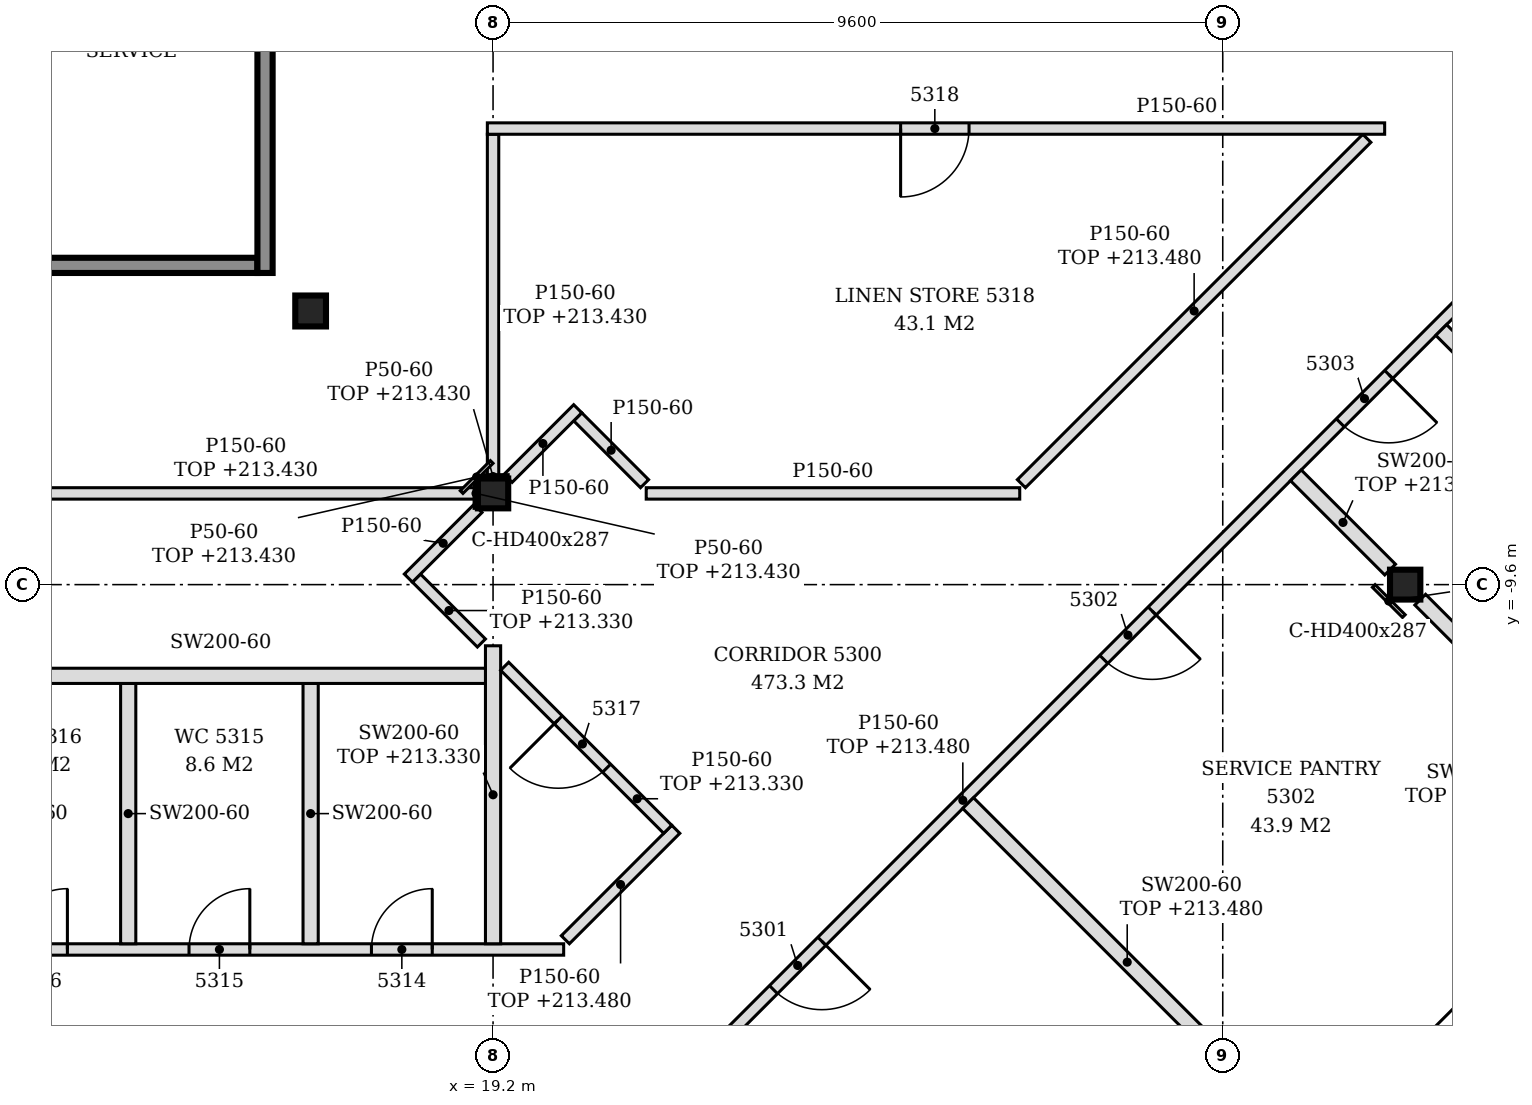
"""IFC4 building model, lengths in metres.
Left out: names, types, materials, properties, quantities, classifications, styles, units other than length and angle.
Written with IfcOpenShell. Run it as: python <this file> out.ifc"""

import sys

from ifc_helpers import new_model, si_unit, direction, frame, frame_2d, origin, origin_2d, place, context, subcontext, project, spatial, polyline, rectangle, i_section, outline, extrude, element, fill, save


model = new_model("IFC4")
c1 = context("Model", 3, precision=1e-05, world=origin(), true_north=direction((0.0, 1.0)))
c2 = subcontext(c1, "Body", "Model", "MODEL_VIEW")
j1 = project(units=[si_unit("LENGTHUNIT", "METRE"), si_unit("PLANEANGLEUNIT", "RADIAN")], contexts=[c1])
p1 = place(None, origin())
s1 = spatial("IfcSite", under=j1, at=p1, CompositionType="ELEMENT")
p2 = place(p1, origin())
s2 = spatial("IfcBuilding", under=s1, at=p2, CompositionType="ELEMENT")
p3 = place(p2, frame((0.0, 0.0, 210.6)))
s3 = spatial("IfcBuildingStorey", under=s2, at=p3, CompositionType="ELEMENT", Elevation=210.6)
p4 = place(p3, frame((19.2, -8.4, -0.15), z_axis=(0.0, 0.0, 1.0), x_axis=(1.0, 0.0, 0.0)))
e1 = element("IfcColumn", 1, at=p4, inside=s3, PredefinedType="COLUMN", context=c2, shape_type="SweptSolid", body=[
    extrude(i_section(OverallWidth=0.399, OverallDepth=0.393, WebThickness=0.023, FlangeThickness=0.037, FilletRadius=0.015, at=origin_2d()), origin(), (0.0, 0.0, 1.0), 3.6),
])
p5 = place(p3, frame((16.8, -6.0, -0.15), z_axis=(0.0, 0.0, 1.0), x_axis=(1.0, 0.0, 0.0)))
e2 = element("IfcColumn", 2, at=p5, inside=s3, PredefinedType="COLUMN", context=c2, shape_type="SweptSolid", body=[
    extrude(i_section(OverallWidth=0.404, OverallDepth=0.407, WebThickness=0.027, FlangeThickness=0.044, FilletRadius=0.015, at=origin_2d()), origin(), (0.0, 0.0, 1.0), 3.6),
])
p6 = place(p3, frame((31.2, -9.6, -0.15), z_axis=(0.0, 0.0, 1.0), x_axis=(1.0, 0.0, 0.0)))
e3 = element("IfcColumn", 3, at=p6, inside=s3, PredefinedType="COLUMN", context=c2, shape_type="SweptSolid", body=[
    extrude(i_section(OverallWidth=0.399, OverallDepth=0.393, WebThickness=0.023, FlangeThickness=0.037, FilletRadius=0.015, at=origin_2d()), origin(), (0.0, 0.0, 1.0), 3.6),
])
p7 = place(p3, frame((12.7, -5.4, 0.0), z_axis=(0.0, 0.0, 1.0), x_axis=(1.0, 0.0, 0.0)))
e4 = element("IfcWall", 4, at=p7, inside=s3, PredefinedType="SOLIDWALL", context=c2, shape_type="SweptSolid", body=[
    extrude(rectangle(XDim=3.4, YDim=0.2, at=frame_2d((1.7, 0.0))), origin(), (0.0, 0.0, 1.0), 3.45),
])
p8 = place(p3, frame((16.2, -5.5, 0.0), z_axis=(0.0, 0.0, 1.0), x_axis=(0.0, 1.0, 0.0)))
e5 = element("IfcWall", 5, at=p8, inside=s3, PredefinedType="SOLIDWALL", context=c2, shape_type="SweptSolid", body=[
    extrude(rectangle(XDim=15.8, YDim=0.2, at=frame_2d((7.9, 0.0))), origin(), (0.0, 0.0, 1.0), 3.45),
])
p9 = place(p8, frame((3.05, 0.0, 0.0)))
e6 = element("IfcOpeningElement", 6, at=p9, cuts=e5, PredefinedType="OPENING", context=c2, shape_type="SweptSolid", body=[
    extrude(rectangle(XDim=1.3, YDim=2.1, at=frame_2d((0.65, 1.05))), frame((0.0, 0.11, 0.0), z_axis=(0.0, -1.0, 0.0), x_axis=(1.0, 0.0, 0.0)), (0.0, 0.0, 1.0), 0.22),
])
p10 = place(p8, frame((11.45, 0.0, 0.0)))
e7 = element("IfcOpeningElement", 7, at=p10, cuts=e5, PredefinedType="OPENING", context=c2, shape_type="SweptSolid", body=[
    extrude(rectangle(XDim=1.3, YDim=2.1, at=frame_2d((0.65, 1.05))), frame((0.0, 0.11, 0.0), z_axis=(0.0, -1.0, 0.0), x_axis=(1.0, 0.0, 0.0)), (0.0, 0.0, 1.0), 0.22),
])
p11 = place(p3, frame((21.146, -16.672, 0.0), z_axis=(0.0, 0.0, 1.0), x_axis=(0.707100999376, 0.70711256295, 0.0)))
e8 = element("IfcWall", 8, at=p11, inside=s3, PredefinedType="PARTITIONING", context=c2, shape_type="SweptSolid", body=[
    extrude(rectangle(XDim=21.113, YDim=0.15, at=frame_2d((10.556, 0.0))), origin(), (0.0, 0.0, 1.0), 2.88),
])
p12 = place(p11, frame((2.466, 0.0, 0.0)))
e9 = element("IfcOpeningElement", 9, at=p12, cuts=e8, PredefinedType="OPENING", context=c2, shape_type="SweptSolid", body=[
    extrude(rectangle(XDim=0.9, YDim=2.1, at=frame_2d((0.45, 1.05))), frame((0.0, 0.085, 0.0), z_axis=(0.0, -1.0, 0.0), x_axis=(1.0, 0.0, 0.0)), (0.0, 0.0, 1.0), 0.17),
])
p13 = place(p11, frame((8.611, 0.0, 0.0)))
e10 = element("IfcOpeningElement", 10, at=p13, cuts=e8, PredefinedType="OPENING", context=c2, shape_type="SweptSolid", body=[
    extrude(rectangle(XDim=0.9, YDim=2.1, at=frame_2d((0.45, 1.05))), frame((0.0, 0.085, 0.0), z_axis=(0.0, -1.0, 0.0), x_axis=(1.0, 0.0, 0.0)), (0.0, 0.0, 1.0), 0.17),
])
p14 = place(p11, frame((13.012, 0.0, 0.0)))
e11 = element("IfcOpeningElement", 11, at=p14, cuts=e8, PredefinedType="OPENING", context=c2, shape_type="SweptSolid", body=[
    extrude(rectangle(XDim=0.9, YDim=2.1, at=frame_2d((0.45, 1.05))), frame((0.0, 0.085, 0.0), z_axis=(0.0, -1.0, 0.0), x_axis=(1.0, 0.0, 0.0)), (0.0, 0.0, 1.0), 0.17),
])
p15 = place(p11, frame((16.261, 0.0, 0.0)))
e12 = element("IfcOpeningElement", 12, at=p15, cuts=e8, PredefinedType="OPENING", context=c2, shape_type="SweptSolid", body=[
    extrude(rectangle(XDim=0.9, YDim=2.1, at=frame_2d((0.45, 1.05))), frame((0.0, 0.085, 0.0), z_axis=(0.0, -1.0, 0.0), x_axis=(1.0, 0.0, 0.0)), (0.0, 0.0, 1.0), 0.17),
])
p16 = place(p3, frame((29.636, -16.66, 0.0), z_axis=(0.0, 0.0, 1.0), x_axis=(-0.707106781187, 0.707106781187, 0.0)))
e13 = element("IfcWall", 13, at=p16, inside=s3, PredefinedType="PARTITIONING", context=c2, shape_type="SweptSolid", body=[
    extrude(rectangle(XDim=5.92, YDim=0.2, at=frame_2d((2.96, 0.0))), origin(), (0.0, 0.0, 1.0), 2.88),
])
p17 = place(p3, frame((2.325, -14.4, 0.0), z_axis=(0.0, 0.0, 1.0), x_axis=(1.0, 0.0, 0.0)))
e14 = element("IfcWall", 14, at=p17, inside=s3, PredefinedType="PARTITIONING", context=c2, shape_type="SweptSolid", body=[
    extrude(outline(polyline([(0.0, 0.0), (17.804, 0.0), (17.804, 2.88), (17.025, 2.88), (17.023, 2.73), (16.725, 2.73), (16.723, 2.88), (5.025, 2.88), (5.023, 2.73), (4.725, 2.73), (4.723, 2.88), (0.0, 2.88), (0.0, 0.0)])), frame((0.0, 0.075, 0.0), z_axis=(0.0, -1.0, 0.0), x_axis=(1.0, 0.0, 0.0)), (0.0, 0.0, 1.0), 0.15),
])
p18 = place(p17, frame((15.275, 0.0, 0.0)))
e15 = element("IfcOpeningElement", 15, at=p18, cuts=e14, PredefinedType="OPENING", context=c2, shape_type="SweptSolid", body=[
    extrude(rectangle(XDim=0.8, YDim=2.1, at=frame_2d((0.4, 1.05))), frame((0.0, 0.085, 0.0), z_axis=(0.0, -1.0, 0.0), x_axis=(1.0, 0.0, 0.0)), (0.0, 0.0, 1.0), 0.17),
])
p19 = place(p17, frame((12.875, 0.0, 0.0)))
e16 = element("IfcOpeningElement", 16, at=p19, cuts=e14, PredefinedType="OPENING", context=c2, shape_type="SweptSolid", body=[
    extrude(rectangle(XDim=0.8, YDim=2.1, at=frame_2d((0.4, 1.05))), frame((0.0, 0.085, 0.0), z_axis=(0.0, -1.0, 0.0), x_axis=(1.0, 0.0, 0.0)), (0.0, 0.0, 1.0), 0.17),
])
p20 = place(p17, frame((10.475, 0.0, 0.0)))
e17 = element("IfcOpeningElement", 17, at=p20, cuts=e14, PredefinedType="OPENING", context=c2, shape_type="SweptSolid", body=[
    extrude(rectangle(XDim=0.8, YDim=2.1, at=frame_2d((0.4, 1.05))), frame((0.0, 0.085, 0.0), z_axis=(0.0, -1.0, 0.0), x_axis=(1.0, 0.0, 0.0)), (0.0, 0.0, 1.0), 0.17),
])
for number, where, z_axis, x_axis in (
    (18, (14.4, -14.325, 0.0), (0.0, 0.0, 1.0), (0.0, 1.0, 0.0)),
    (19, (16.8, -14.325, 0.0), (0.0, 0.0, 1.0), (0.0, 1.0, 0.0)),
):
    element("IfcWall", number, at=place(p3, frame(where, z_axis=z_axis, x_axis=x_axis)), inside=s3, PredefinedType="PARTITIONING", context=c2, shape_type="SweptSolid", body=[
        extrude(outline(polyline([(0.0, 0.0), (3.425, 0.0), (3.425, 3.45), (0.03, 3.45), (0.028, 2.88), (0.0, 2.88), (0.0, 0.0)])), frame((0.0, 0.1, 0.0), z_axis=(0.0, -1.0, 0.0), x_axis=(1.0, 0.0, 0.0)), (0.0, 0.0, 1.0), 0.2),
    ])
p21 = place(p3, frame((19.2, -14.325, 0.0), z_axis=(0.0, 0.0, 1.0), x_axis=(0.0, 1.0, 0.0)))
e20 = element("IfcWall", 20, at=p21, inside=s3, PredefinedType="PARTITIONING", context=c2, shape_type="SweptSolid", body=[
    extrude(rectangle(XDim=3.92, YDim=0.2, at=frame_2d((1.96, 0.0))), origin(), (0.0, 0.0, 1.0), 2.73),
])
p22 = place(p3, frame((20.151, -14.272, 0.0), z_axis=(0.0, 0.0, 1.0), x_axis=(0.707106781187, 0.707106781187, 0.0)))
e21 = element("IfcWall", 21, at=p22, inside=s3, PredefinedType="PARTITIONING", context=c2, shape_type="SweptSolid", body=[
    extrude(rectangle(XDim=2.055, YDim=0.15, at=frame_2d((1.027, 0.0))), origin(), (0.0, 0.0, 1.0), 2.88),
])
p23 = place(p3, frame((34.581, -12.981, 0.0), z_axis=(0.0, 0.0, 1.0), x_axis=(-0.707133900936, 0.707079660397, 0.0)))
e22 = element("IfcWall", 22, at=p23, inside=s3, PredefinedType="PARTITIONING", context=c2, shape_type="SweptSolid", body=[
    extrude(rectangle(XDim=4.501, YDim=0.2, at=frame_2d((2.25, 0.0))), origin(), (0.0, 0.0, 1.0), 2.63),
])
p24 = place(p3, frame((21.498, -12.819, 0.0), z_axis=(0.0, 0.0, 1.0), x_axis=(-0.707106781187, 0.707106781187, 0.0)))
e23 = element("IfcWall", 23, at=p24, inside=s3, PredefinedType="PARTITIONING", context=c2, shape_type="SweptSolid", body=[
    extrude(rectangle(XDim=3.033, YDim=0.15, at=frame_2d((1.517, 0.0))), origin(), (0.0, 0.0, 1.0), 2.73),
])
p25 = place(p24, frame((1.137, 0.0, 0.0)))
e24 = element("IfcOpeningElement", 24, at=p25, cuts=e23, PredefinedType="OPENING", context=c2, shape_type="SweptSolid", body=[
    extrude(rectangle(XDim=0.9, YDim=2.1, at=frame_2d((0.45, 1.05))), frame((0.0, 0.085, 0.0), z_axis=(0.0, -1.0, 0.0), x_axis=(1.0, 0.0, 0.0)), (0.0, 0.0, 1.0), 0.17),
])
p26 = place(p3, frame((11.9, -10.8, 0.0), z_axis=(0.0, 0.0, 1.0), x_axis=(1.0, 0.0, 0.0)))
e25 = element("IfcWall", 25, at=p26, inside=s3, PredefinedType="PARTITIONING", context=c2, shape_type="SweptSolid", body=[
    extrude(outline(polyline([(0.0, 0.0), (7.2, 0.0), (7.2, 2.73), (7.15, 2.73), (7.148, 3.45), (0.0, 3.45), (0.0, 0.0)])), frame((0.0, 0.1, 0.0), z_axis=(0.0, -1.0, 0.0), x_axis=(1.0, 0.0, 0.0)), (0.0, 0.0, 1.0), 0.2),
])
p27 = place(p3, frame((19.047, -10.368, 0.0), z_axis=(0.0, 0.0, 1.0), x_axis=(-0.707409718716, 0.706803713817, 0.0)))
e26 = element("IfcWall", 26, at=p27, inside=s3, PredefinedType="PARTITIONING", context=c2, shape_type="SweptSolid", body=[
    extrude(rectangle(XDim=1.208, YDim=0.15, at=frame_2d((0.604, 0.0))), origin(), (0.0, 0.0, 1.0), 2.73),
])
p28 = place(p3, frame((35.86, -10.436, 0.0), z_axis=(0.0, 0.0, 1.0), x_axis=(-0.707106781187, 0.707106781187, 0.0)))
e27 = element("IfcWall", 27, at=p28, inside=s3, PredefinedType="PARTITIONING", context=c2, shape_type="SweptSolid", body=[
    extrude(rectangle(XDim=5.92, YDim=0.2, at=frame_2d((2.96, 0.0))), origin(), (0.0, 0.0, 1.0), 3.07),
])
p29 = place(p3, frame((18.086, -9.514, 0.0), z_axis=(0.0, 0.0, 1.0), x_axis=(0.707106781187, 0.707106781187, 0.0)))
e28 = element("IfcWall", 28, at=p29, inside=s3, PredefinedType="PARTITIONING", context=c2, shape_type="SweptSolid", body=[
    extrude(rectangle(XDim=1.295, YDim=0.15, at=frame_2d((0.648, 0.0))), origin(), (0.0, 0.0, 1.0), 3.45),
])
p30 = place(p3, frame((31.002, -9.402, 0.0), z_axis=(0.0, 0.0, 1.0), x_axis=(-0.707106781187, 0.707106781187, 0.0)))
e29 = element("IfcWall", 29, at=p30, inside=s3, PredefinedType="PARTITIONING", context=c2, shape_type="SweptSolid", body=[
    extrude(rectangle(XDim=1.754, YDim=0.2, at=frame_2d((0.877, 0.0))), origin(), (0.0, 0.0, 1.0), 2.93),
])
p31 = place(p3, frame((7.399, -8.4, 0.0), z_axis=(0.0, 0.0, 1.0), x_axis=(1.0, 0.0, 0.0)))
e30 = element("IfcWall", 30, at=p31, inside=s3, PredefinedType="PARTITIONING", context=c2, shape_type="SweptSolid", body=[
    extrude(rectangle(XDim=11.601, YDim=0.15, at=frame_2d((5.801, 0.0))), origin(), (0.0, 0.0, 1.0), 2.83),
])
p32 = place(p31, frame((4.601, 0.0, 0.0)))
e31 = element("IfcOpeningElement", 31, at=p32, cuts=e30, PredefinedType="OPENING", context=c2, shape_type="SweptSolid", body=[
    extrude(rectangle(XDim=0.9, YDim=2.1, at=frame_2d((0.45, 1.05))), frame((0.0, 0.085, 0.0), z_axis=(0.0, -1.0, 0.0), x_axis=(1.0, 0.0, 0.0)), (0.0, 0.0, 1.0), 0.17),
])
p33 = place(p3, frame((21.215, -8.4, 0.0), z_axis=(0.0, 0.0, 1.0), x_axis=(1.0, 0.0, 0.0)))
e32 = element("IfcWall", 32, at=p33, inside=s3, PredefinedType="PARTITIONING", context=c2, shape_type="SweptSolid", body=[
    extrude(rectangle(XDim=4.914, YDim=0.15, at=frame_2d((2.457, 0.0))), origin(), (0.0, 0.0, 1.0), 3.45),
])
p34 = place(p3, frame((21.193, -8.272, 0.0), z_axis=(0.0, 0.0, 1.0), x_axis=(-0.706812296552, 0.70740114323, 0.0)))
e33 = element("IfcWall", 33, at=p34, inside=s3, PredefinedType="PARTITIONING", context=c2, shape_type="SweptSolid", body=[
    extrude(rectangle(XDim=1.244, YDim=0.15, at=frame_2d((0.622, 0.0))), origin(), (0.0, 0.0, 1.0), 3.45),
])
p35 = place(p3, frame((26.151, -8.272, 0.0), z_axis=(0.0, 0.0, 1.0), x_axis=(0.707163762272, 0.707049795509, 0.0)))
e34 = element("IfcWall", 34, at=p35, inside=s3, PredefinedType="PARTITIONING", context=c2, shape_type="SweptSolid", body=[
    extrude(rectangle(XDim=6.427, YDim=0.15, at=frame_2d((3.213, 0.0))), origin(), (0.0, 0.0, 1.0), 2.88),
])
p36 = place(p3, frame((19.2, -8.204, 0.0), z_axis=(0.0, 0.0, 1.0), x_axis=(0.0, 1.0, 0.0)))
e35 = element("IfcWall", 35, at=p36, inside=s3, PredefinedType="PARTITIONING", context=c2, shape_type="SweptSolid", body=[
    extrude(rectangle(XDim=4.529, YDim=0.15, at=frame_2d((2.264, 0.0))), origin(), (0.0, 0.0, 1.0), 2.83),
])
p37 = place(p3, frame((19.398, -8.202, 0.0), z_axis=(0.0, 0.0, 1.0), x_axis=(0.707200993001, 0.707012556818, 0.0)))
e36 = element("IfcWall", 36, at=p37, inside=s3, PredefinedType="PARTITIONING", context=c2, shape_type="SweptSolid", body=[
    extrude(rectangle(XDim=1.296, YDim=0.15, at=frame_2d((0.648, 0.0))), origin(), (0.0, 0.0, 1.0), 3.45),
])
p38 = place(p3, frame((19.125, -3.6, 0.0), z_axis=(0.0, 0.0, 1.0), x_axis=(1.0, 0.0, 0.0)))
e37 = element("IfcWall", 37, at=p38, inside=s3, PredefinedType="PARTITIONING", context=c2, shape_type="SweptSolid", body=[
    extrude(outline(polyline([(0.0, 0.0), (11.805, 0.0), (11.805, 3.45), (0.225, 3.45), (0.223, 2.83), (0.0, 2.83), (0.0, 0.0)])), frame((0.0, 0.075, 0.0), z_axis=(0.0, -1.0, 0.0), x_axis=(1.0, 0.0, 0.0)), (0.0, 0.0, 1.0), 0.15),
])
p39 = place(p38, frame((5.437, 0.0, 0.0)))
e38 = element("IfcOpeningElement", 38, at=p39, cuts=e37, PredefinedType="OPENING", context=c2, shape_type="SweptSolid", body=[
    extrude(rectangle(XDim=0.9, YDim=2.1, at=frame_2d((0.45, 1.05))), frame((0.0, 0.085, 0.0), z_axis=(0.0, -1.0, 0.0), x_axis=(1.0, 0.0, 0.0)), (0.0, 0.0, 1.0), 0.17),
])
p40 = place(p3, frame((31.182, -10.014, 0.0), z_axis=(0.0, 0.0, 1.0), x_axis=(-0.707106781187, 0.707106781187, 0.0)))
e39 = element("IfcWall", 39, at=p40, inside=s3, PredefinedType="PARTITIONING", context=c2, shape_type="SweptSolid", body=[
    extrude(rectangle(XDim=0.56, YDim=0.05, at=frame_2d((0.28, 0.0))), origin(), (0.0, 0.0, 1.0), 2.88),
])
p41 = place(p3, frame((18.786, -8.382, 0.0), z_axis=(0.0, 0.0, 1.0), x_axis=(0.707106781187, 0.707106781187, 0.0)))
e40 = element("IfcWall", 40, at=p41, inside=s3, PredefinedType="PARTITIONING", context=c2, shape_type="SweptSolid", body=[
    extrude(rectangle(XDim=0.56, YDim=0.05, at=frame_2d((0.28, 0.0))), origin(), (0.0, 0.0, 1.0), 2.83),
])
p42 = place(p3, frame((19.0, -8.178, 0.0), z_axis=(0.0, 0.0, 1.0), x_axis=(1.0, 0.0, 0.0)))
e41 = element("IfcWall", 41, at=p42, inside=s3, PredefinedType="PARTITIONING", context=c2, shape_type="SweptSolid", body=[
    extrude(rectangle(XDim=0.399, YDim=0.05, at=frame_2d((0.199, 0.0))), origin(), (0.0, 0.0, 1.0), 2.83),
])
p43 = place(p3, frame((18.976, -8.596, 0.0), z_axis=(0.0, 0.0, 1.0), x_axis=(0.0, 1.0, 0.0)))
e42 = element("IfcWall", 42, at=p43, inside=s3, PredefinedType="PARTITIONING", context=c2, shape_type="SweptSolid", body=[
    extrude(rectangle(XDim=0.393, YDim=0.05, at=frame_2d((0.196, 0.0))), origin(), (0.0, 0.0, 1.0), 2.83),
])
p44 = place(p12, frame((0.9, 0.0, 0.0), z_axis=(0.0, 0.0, 1.0), x_axis=(-1.0, 0.0, 0.0)))
e43 = element("IfcDoor", 43, at=p44, inside=s3, OperationType="SINGLE_SWING_LEFT", PredefinedType="DOOR", context=c2, shape_type="SweptSolid", body=[
    extrude(rectangle(XDim=0.9, YDim=2.1, at=frame_2d((0.45, 1.05))), frame((0.0, 0.025, 0.0), z_axis=(0.0, -1.0, 0.0), x_axis=(1.0, 0.0, 0.0)), (0.0, 0.0, 1.0), 0.05),
])
fill(e9, e43)
p45 = place(p13, frame((0.9, 0.0, 0.0), z_axis=(0.0, 0.0, 1.0), x_axis=(-1.0, 0.0, 0.0)))
e44 = element("IfcDoor", 44, at=p45, inside=s3, OperationType="SINGLE_SWING_LEFT", PredefinedType="DOOR", context=c2, shape_type="SweptSolid", body=[
    extrude(rectangle(XDim=0.9, YDim=2.1, at=frame_2d((0.45, 1.05))), frame((0.0, 0.025, 0.0), z_axis=(0.0, -1.0, 0.0), x_axis=(1.0, 0.0, 0.0)), (0.0, 0.0, 1.0), 0.05),
])
fill(e10, e44)
p46 = place(p14, frame((0.9, 0.0, 0.0), z_axis=(0.0, 0.0, 1.0), x_axis=(-1.0, 0.0, 0.0)))
e45 = element("IfcDoor", 45, at=p46, inside=s3, OperationType="SINGLE_SWING_LEFT", PredefinedType="DOOR", context=c2, shape_type="SweptSolid", body=[
    extrude(rectangle(XDim=0.9, YDim=2.1, at=frame_2d((0.45, 1.05))), frame((0.0, 0.025, 0.0), z_axis=(0.0, -1.0, 0.0), x_axis=(1.0, 0.0, 0.0)), (0.0, 0.0, 1.0), 0.05),
])
fill(e11, e45)
p47 = place(p18, origin())
e46 = element("IfcDoor", 46, at=p47, inside=s3, OperationType="SINGLE_SWING_RIGHT", PredefinedType="DOOR", context=c2, shape_type="SweptSolid", body=[
    extrude(rectangle(XDim=0.8, YDim=2.1, at=frame_2d((0.4, 1.05))), frame((0.0, 0.025, 0.0), z_axis=(0.0, -1.0, 0.0), x_axis=(1.0, 0.0, 0.0)), (0.0, 0.0, 1.0), 0.05),
])
fill(e15, e46)
p48 = place(p19, origin())
e47 = element("IfcDoor", 47, at=p48, inside=s3, OperationType="SINGLE_SWING_RIGHT", PredefinedType="DOOR", context=c2, shape_type="SweptSolid", body=[
    extrude(rectangle(XDim=0.8, YDim=2.1, at=frame_2d((0.4, 1.05))), frame((0.0, 0.025, 0.0), z_axis=(0.0, -1.0, 0.0), x_axis=(1.0, 0.0, 0.0)), (0.0, 0.0, 1.0), 0.05),
])
fill(e16, e47)
p49 = place(p20, origin())
e48 = element("IfcDoor", 48, at=p49, inside=s3, OperationType="SINGLE_SWING_RIGHT", PredefinedType="DOOR", context=c2, shape_type="SweptSolid", body=[
    extrude(rectangle(XDim=0.8, YDim=2.1, at=frame_2d((0.4, 1.05))), frame((0.0, 0.025, 0.0), z_axis=(0.0, -1.0, 0.0), x_axis=(1.0, 0.0, 0.0)), (0.0, 0.0, 1.0), 0.05),
])
fill(e17, e48)
p50 = place(p25, origin())
e49 = element("IfcDoor", 49, at=p50, inside=s3, OperationType="SINGLE_SWING_RIGHT", PredefinedType="DOOR", context=c2, shape_type="SweptSolid", body=[
    extrude(rectangle(XDim=0.9, YDim=2.1, at=frame_2d((0.45, 1.05))), frame((0.0, 0.025, 0.0), z_axis=(0.0, -1.0, 0.0), x_axis=(1.0, 0.0, 0.0)), (0.0, 0.0, 1.0), 0.05),
])
fill(e24, e49)
p51 = place(p39, frame((0.9, 0.0, 0.0), z_axis=(0.0, 0.0, 1.0), x_axis=(-1.0, 0.0, 0.0)))
e50 = element("IfcDoor", 50, at=p51, inside=s3, OperationType="SINGLE_SWING_RIGHT", PredefinedType="DOOR", context=c2, shape_type="SweptSolid", body=[
    extrude(rectangle(XDim=0.9, YDim=2.1, at=frame_2d((0.45, 1.05))), frame((0.0, 0.025, 0.0), z_axis=(0.0, -1.0, 0.0), x_axis=(1.0, 0.0, 0.0)), (0.0, 0.0, 1.0), 0.05),
])
fill(e38, e50)
save(model, sys.argv[1])
